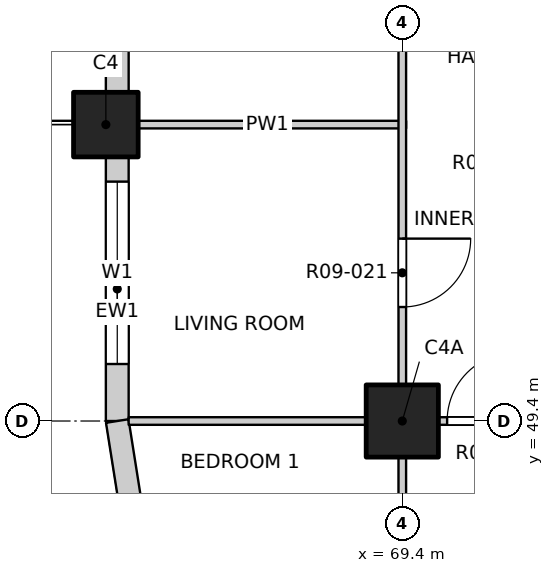
"""IFC4 building model, lengths in metres.
Left out: names, types, materials, properties, quantities, classifications, styles, units other than length and angle.
Written with IfcOpenShell. Run it as: python <this file> out.ifc"""

import sys

from ifc_helpers import new_model, si_unit, direction, frame, frame_2d, origin, origin_2d, place, context, subcontext, project, spatial, rectangle, extrude, element, fill, save


model = new_model("IFC4")
c1 = context("Model", 3, precision=1e-05, world=origin(), true_north=direction((0.0, 1.0)))
c2 = subcontext(c1, "Body", "Model", "MODEL_VIEW")
j1 = project(units=[si_unit("LENGTHUNIT", "METRE"), si_unit("PLANEANGLEUNIT", "RADIAN")], contexts=[c1])
p1 = place(None, origin())
s1 = spatial("IfcSite", under=j1, at=p1, CompositionType="ELEMENT")
p2 = place(p1, origin())
s2 = spatial("IfcBuilding", under=s1, at=p2, CompositionType="ELEMENT")
p3 = place(p2, frame((0.0, 0.0, 113.5)))
s3 = spatial("IfcBuildingStorey", under=s2, at=p3, CompositionType="ELEMENT", Elevation=113.5)
p4 = place(p3, frame((65.5, 53.3, -0.25), z_axis=(0.0, 0.0, 1.0), x_axis=(1.0, 0.0, 0.0)))
e1 = element("IfcColumn", 1, at=p4, inside=s3, PredefinedType="COLUMN", context=c2, shape_type="SweptSolid", body=[
    extrude(rectangle(XDim=0.85, YDim=0.85, at=origin_2d()), origin(), (0.0, 0.0, 1.0), 3.35),
])
p5 = place(p3, frame((69.4, 49.4, -0.25), z_axis=(0.0, 0.0, 1.0), x_axis=(1.0, 0.0, 0.0)))
e2 = element("IfcColumn", 2, at=p5, inside=s3, PredefinedType="COLUMN", context=c2, shape_type="SweptSolid", body=[
    extrude(rectangle(XDim=0.95, YDim=0.95, at=origin_2d()), origin(), (0.0, 0.0, 1.0), 3.35),
])
p6 = place(p3, frame((65.65, 49.4, 0.0), z_axis=(0.0, 0.0, 1.0), x_axis=(0.0, 1.0, 0.0)))
e3 = element("IfcWall", 3, at=p6, inside=s3, PredefinedType="SOLIDWALL", context=c2, shape_type="SweptSolid", body=[
    extrude(rectangle(XDim=3.475, YDim=0.3, at=frame_2d((1.738, 0.0))), origin(), (0.0, 0.0, 1.0), 3.1),
])
p7 = place(p6, frame((0.75, 0.0, 0.9)))
e4 = element("IfcOpeningElement", 4, at=p7, cuts=e3, PredefinedType="OPENING", context=c2, shape_type="SweptSolid", body=[
    extrude(rectangle(XDim=2.4, YDim=1.8, at=frame_2d((1.2, 0.9))), frame((0.0, 0.16, 0.0), z_axis=(0.0, -1.0, 0.0), x_axis=(1.0, 0.0, 0.0)), (0.0, 0.0, 1.0), 0.32),
])
p8 = place(p3, frame((65.65, 53.725, 0.0), z_axis=(0.0, 0.0, 1.0), x_axis=(0.0, 1.0, 0.0)))
e5 = element("IfcWall", 5, at=p8, inside=s3, PredefinedType="SOLIDWALL", context=c2, shape_type="SweptSolid", body=[
    extrude(rectangle(XDim=6.95, YDim=0.3, at=frame_2d((3.475, 0.0))), origin(), (0.0, 0.0, 1.0), 3.1),
])
p9 = place(p8, frame((0.625, 0.0, 0.0)))
e6 = element("IfcOpeningElement", 6, at=p9, cuts=e5, PredefinedType="OPENING", context=c2, shape_type="SweptSolid", body=[
    extrude(rectangle(XDim=1.8, YDim=2.4, at=frame_2d((0.9, 1.2))), frame((0.0, 0.16, 0.0), z_axis=(0.0, -1.0, 0.0), x_axis=(1.0, 0.0, 0.0)), (0.0, 0.0, 1.0), 0.32),
])
p10 = place(p8, frame((4.225, 0.0, 0.9)))
e7 = element("IfcOpeningElement", 7, at=p10, cuts=e5, PredefinedType="OPENING", context=c2, shape_type="SweptSolid", body=[
    extrude(rectangle(XDim=2.4, YDim=1.8, at=frame_2d((1.2, 0.9))), frame((0.0, 0.16, 0.0), z_axis=(0.0, -1.0, 0.0), x_axis=(1.0, 0.0, 0.0)), (0.0, 0.0, 1.0), 0.32),
])
p11 = place(p3, frame((65.65, 49.4, 0.0), z_axis=(0.0, 0.0, 1.0), x_axis=(0.156496880861, -0.987678452879, 0.0)))
e8 = element("IfcWall", 8, at=p11, inside=s3, PredefinedType="SOLIDWALL", context=c2, shape_type="SweptSolid", body=[
    extrude(rectangle(XDim=1.173, YDim=0.3, at=frame_2d((0.586, 0.0))), origin(), (0.0, 0.0, 1.0), 3.1),
])
p12 = place(p3, frame((65.8, 49.4, 0.0), z_axis=(0.0, 0.0, 1.0), x_axis=(1.0, 0.0, 0.0)))
e9 = element("IfcWall", 9, at=p12, inside=s3, PredefinedType="PARTITIONING", context=c2, shape_type="SweptSolid", body=[
    extrude(rectangle(XDim=38.4, YDim=0.1, at=frame_2d((19.2, 0.0))), origin(), (0.0, 0.0, 1.0), 3.1),
])
p13 = place(p12, frame((4.19, 0.0, 0.0)))
e10 = element("IfcOpeningElement", 10, at=p13, cuts=e9, PredefinedType="OPENING", context=c2, shape_type="SweptSolid", body=[
    extrude(rectangle(XDim=0.9, YDim=2.1, at=frame_2d((0.45, 1.05))), frame((0.0, 0.06, 0.0), z_axis=(0.0, -1.0, 0.0), x_axis=(1.0, 0.0, 0.0)), (0.0, 0.0, 1.0), 0.12),
])
p14 = place(p12, frame((9.0, 0.0, 0.0)))
e11 = element("IfcOpeningElement", 11, at=p14, cuts=e9, PredefinedType="OPENING", context=c2, shape_type="SweptSolid", body=[
    extrude(rectangle(XDim=0.9, YDim=2.1, at=frame_2d((0.45, 1.05))), frame((0.0, 0.06, 0.0), z_axis=(0.0, -1.0, 0.0), x_axis=(1.0, 0.0, 0.0)), (0.0, 0.0, 1.0), 0.12),
])
p15 = place(p12, frame((12.9, 0.0, 0.0)))
e12 = element("IfcOpeningElement", 12, at=p15, cuts=e9, PredefinedType="OPENING", context=c2, shape_type="SweptSolid", body=[
    extrude(rectangle(XDim=0.9, YDim=2.1, at=frame_2d((0.45, 1.05))), frame((0.0, 0.06, 0.0), z_axis=(0.0, -1.0, 0.0), x_axis=(1.0, 0.0, 0.0)), (0.0, 0.0, 1.0), 0.12),
])
p16 = place(p12, frame((16.8, 0.0, 0.0)))
e13 = element("IfcOpeningElement", 13, at=p16, cuts=e9, PredefinedType="OPENING", context=c2, shape_type="SweptSolid", body=[
    extrude(rectangle(XDim=0.9, YDim=2.1, at=frame_2d((0.45, 1.05))), frame((0.0, 0.06, 0.0), z_axis=(0.0, -1.0, 0.0), x_axis=(1.0, 0.0, 0.0)), (0.0, 0.0, 1.0), 0.12),
])
p17 = place(p12, frame((20.7, 0.0, 0.0)))
e14 = element("IfcOpeningElement", 14, at=p17, cuts=e9, PredefinedType="OPENING", context=c2, shape_type="SweptSolid", body=[
    extrude(rectangle(XDim=0.9, YDim=2.1, at=frame_2d((0.45, 1.05))), frame((0.0, 0.06, 0.0), z_axis=(0.0, -1.0, 0.0), x_axis=(1.0, 0.0, 0.0)), (0.0, 0.0, 1.0), 0.12),
])
p18 = place(p12, frame((24.6, 0.0, 0.0)))
e15 = element("IfcOpeningElement", 15, at=p18, cuts=e9, PredefinedType="OPENING", context=c2, shape_type="SweptSolid", body=[
    extrude(rectangle(XDim=0.9, YDim=2.1, at=frame_2d((0.45, 1.05))), frame((0.0, 0.06, 0.0), z_axis=(0.0, -1.0, 0.0), x_axis=(1.0, 0.0, 0.0)), (0.0, 0.0, 1.0), 0.12),
])
p19 = place(p12, frame((28.5, 0.0, 0.0)))
e16 = element("IfcOpeningElement", 16, at=p19, cuts=e9, PredefinedType="OPENING", context=c2, shape_type="SweptSolid", body=[
    extrude(rectangle(XDim=0.9, YDim=2.1, at=frame_2d((0.45, 1.05))), frame((0.0, 0.06, 0.0), z_axis=(0.0, -1.0, 0.0), x_axis=(1.0, 0.0, 0.0)), (0.0, 0.0, 1.0), 0.12),
])
p20 = place(p12, frame((33.31, 0.0, 0.0)))
e17 = element("IfcOpeningElement", 17, at=p20, cuts=e9, PredefinedType="OPENING", context=c2, shape_type="SweptSolid", body=[
    extrude(rectangle(XDim=0.9, YDim=2.1, at=frame_2d((0.45, 1.05))), frame((0.0, 0.06, 0.0), z_axis=(0.0, -1.0, 0.0), x_axis=(1.0, 0.0, 0.0)), (0.0, 0.0, 1.0), 0.12),
])
p21 = place(p3, frame((65.8, 53.3, 0.0), z_axis=(0.0, 0.0, 1.0), x_axis=(1.0, 0.0, 0.0)))
e18 = element("IfcWall", 18, at=p21, inside=s3, PredefinedType="PARTITIONING", context=c2, shape_type="SweptSolid", body=[
    extrude(rectangle(XDim=3.65, YDim=0.1, at=frame_2d((1.825, 0.0))), origin(), (0.0, 0.0, 1.0), 3.1),
])
p22 = place(p3, frame((69.4, 45.8, 0.0), z_axis=(0.0, 0.0, 1.0), x_axis=(0.0, 1.0, 0.0)))
e19 = element("IfcWall", 19, at=p22, inside=s3, PredefinedType="PARTITIONING", context=c2, shape_type="SweptSolid", body=[
    extrude(rectangle(XDim=38.4, YDim=0.1, at=frame_2d((19.2, 0.0))), origin(), (0.0, 0.0, 1.0), 3.1),
])
p23 = place(p22, frame((1.05, 0.0, 0.0)))
e20 = element("IfcOpeningElement", 20, at=p23, cuts=e19, PredefinedType="OPENING", context=c2, shape_type="SweptSolid", body=[
    extrude(rectangle(XDim=1.2, YDim=2.1, at=frame_2d((0.6, 1.05))), frame((0.0, 0.06, 0.0), z_axis=(0.0, -1.0, 0.0), x_axis=(1.0, 0.0, 0.0)), (0.0, 0.0, 1.0), 0.12),
])
p24 = place(p22, frame((5.1, 0.0, 0.0)))
e21 = element("IfcOpeningElement", 21, at=p24, cuts=e19, PredefinedType="OPENING", context=c2, shape_type="SweptSolid", body=[
    extrude(rectangle(XDim=0.9, YDim=2.1, at=frame_2d((0.45, 1.05))), frame((0.0, 0.06, 0.0), z_axis=(0.0, -1.0, 0.0), x_axis=(1.0, 0.0, 0.0)), (0.0, 0.0, 1.0), 0.12),
])
p25 = place(p22, frame((9.0, 0.0, 0.0)))
e22 = element("IfcOpeningElement", 22, at=p25, cuts=e19, PredefinedType="OPENING", context=c2, shape_type="SweptSolid", body=[
    extrude(rectangle(XDim=0.9, YDim=2.1, at=frame_2d((0.45, 1.05))), frame((0.0, 0.06, 0.0), z_axis=(0.0, -1.0, 0.0), x_axis=(1.0, 0.0, 0.0)), (0.0, 0.0, 1.0), 0.12),
])
p26 = place(p22, frame((12.9, 0.0, 0.0)))
e23 = element("IfcOpeningElement", 23, at=p26, cuts=e19, PredefinedType="OPENING", context=c2, shape_type="SweptSolid", body=[
    extrude(rectangle(XDim=0.9, YDim=2.1, at=frame_2d((0.45, 1.05))), frame((0.0, 0.06, 0.0), z_axis=(0.0, -1.0, 0.0), x_axis=(1.0, 0.0, 0.0)), (0.0, 0.0, 1.0), 0.12),
])
p27 = place(p22, frame((16.8, 0.0, 0.0)))
e24 = element("IfcOpeningElement", 24, at=p27, cuts=e19, PredefinedType="OPENING", context=c2, shape_type="SweptSolid", body=[
    extrude(rectangle(XDim=0.9, YDim=2.1, at=frame_2d((0.45, 1.05))), frame((0.0, 0.06, 0.0), z_axis=(0.0, -1.0, 0.0), x_axis=(1.0, 0.0, 0.0)), (0.0, 0.0, 1.0), 0.12),
])
p28 = place(p22, frame((20.7, 0.0, 0.0)))
e25 = element("IfcOpeningElement", 25, at=p28, cuts=e19, PredefinedType="OPENING", context=c2, shape_type="SweptSolid", body=[
    extrude(rectangle(XDim=0.9, YDim=2.1, at=frame_2d((0.45, 1.05))), frame((0.0, 0.06, 0.0), z_axis=(0.0, -1.0, 0.0), x_axis=(1.0, 0.0, 0.0)), (0.0, 0.0, 1.0), 0.12),
])
p29 = place(p22, frame((24.6, 0.0, 0.0)))
e26 = element("IfcOpeningElement", 26, at=p29, cuts=e19, PredefinedType="OPENING", context=c2, shape_type="SweptSolid", body=[
    extrude(rectangle(XDim=0.9, YDim=2.1, at=frame_2d((0.45, 1.05))), frame((0.0, 0.06, 0.0), z_axis=(0.0, -1.0, 0.0), x_axis=(1.0, 0.0, 0.0)), (0.0, 0.0, 1.0), 0.12),
])
p30 = place(p22, frame((28.5, 0.0, 0.0)))
e27 = element("IfcOpeningElement", 27, at=p30, cuts=e19, PredefinedType="OPENING", context=c2, shape_type="SweptSolid", body=[
    extrude(rectangle(XDim=0.9, YDim=2.1, at=frame_2d((0.45, 1.05))), frame((0.0, 0.06, 0.0), z_axis=(0.0, -1.0, 0.0), x_axis=(1.0, 0.0, 0.0)), (0.0, 0.0, 1.0), 0.12),
])
p31 = place(p22, frame((32.4, 0.0, 0.0)))
e28 = element("IfcOpeningElement", 28, at=p31, cuts=e19, PredefinedType="OPENING", context=c2, shape_type="SweptSolid", body=[
    extrude(rectangle(XDim=0.9, YDim=2.1, at=frame_2d((0.45, 1.05))), frame((0.0, 0.06, 0.0), z_axis=(0.0, -1.0, 0.0), x_axis=(1.0, 0.0, 0.0)), (0.0, 0.0, 1.0), 0.12),
])
p32 = place(p22, frame((36.15, 0.0, 0.0)))
e29 = element("IfcOpeningElement", 29, at=p32, cuts=e19, PredefinedType="OPENING", context=c2, shape_type="SweptSolid", body=[
    extrude(rectangle(XDim=1.2, YDim=2.1, at=frame_2d((0.6, 1.05))), frame((0.0, 0.06, 0.0), z_axis=(0.0, -1.0, 0.0), x_axis=(1.0, 0.0, 0.0)), (0.0, 0.0, 1.0), 0.12),
])
p33 = place(p7, origin())
e30 = element("IfcWindow", 30, at=p33, inside=s3, PartitioningType="DOUBLE_PANEL_VERTICAL", PredefinedType="WINDOW", context=c2, shape_type="SweptSolid", body=[
    extrude(rectangle(XDim=2.4, YDim=1.8, at=frame_2d((1.2, 0.9))), frame((0.0, 0.03, 0.0), z_axis=(0.0, -1.0, 0.0), x_axis=(1.0, 0.0, 0.0)), (0.0, 0.0, 1.0), 0.06),
])
fill(e4, e30)
p34 = place(p13, origin())
e31 = element("IfcDoor", 31, at=p34, inside=s3, OperationType="SINGLE_SWING_RIGHT", PredefinedType="DOOR", context=c2, shape_type="SweptSolid", body=[
    extrude(rectangle(XDim=0.9, YDim=2.1, at=frame_2d((0.45, 1.05))), frame((0.0, 0.025, 0.0), z_axis=(0.0, -1.0, 0.0), x_axis=(1.0, 0.0, 0.0)), (0.0, 0.0, 1.0), 0.05),
])
fill(e10, e31)
p35 = place(p24, origin())
e32 = element("IfcDoor", 32, at=p35, inside=s3, OperationType="SINGLE_SWING_LEFT", PredefinedType="DOOR", context=c2, shape_type="SweptSolid", body=[
    extrude(rectangle(XDim=0.9, YDim=2.1, at=frame_2d((0.45, 1.05))), frame((0.0, 0.025, 0.0), z_axis=(0.0, -1.0, 0.0), x_axis=(1.0, 0.0, 0.0)), (0.0, 0.0, 1.0), 0.05),
])
fill(e21, e32)
save(model, sys.argv[1])
